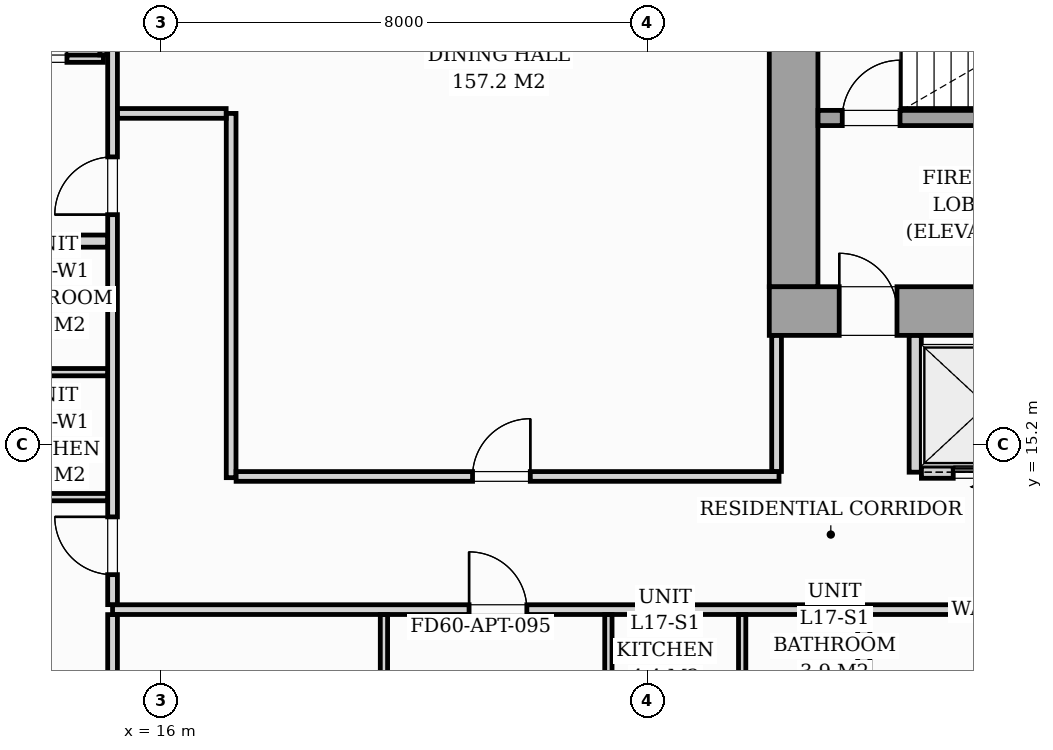
"""IFC4 building model, lengths in metres.
Left out: names, types, materials, properties, quantities, classifications, styles, units other than length and angle.
Written with IfcOpenShell. Run it as: python <this file> out.ifc"""

import sys

from ifc_helpers import new_model, si_unit, direction, frame, frame_2d, origin, origin_2d, place, context, subcontext, project, spatial, rectangle, i_section, extrude, source, transform, mapped, element, fill, save


model = new_model("IFC4")
c1 = context("Model", 3, precision=1e-05, world=origin(), true_north=direction((0.0, 1.0)))
c2 = subcontext(c1, "Body", "Model", "MODEL_VIEW")
j1 = project(units=[si_unit("LENGTHUNIT", "METRE"), si_unit("PLANEANGLEUNIT", "RADIAN")], contexts=[c1])
p1 = place(None, origin())
s1 = spatial("IfcSite", under=j1, at=p1, CompositionType="ELEMENT")
p2 = place(p1, origin())
s2 = spatial("IfcBuilding", under=s1, at=p2, CompositionType="ELEMENT")
p3 = place(p2, frame((0.0, 0.0, 61.4)))
s3 = spatial("IfcBuildingStorey", under=s2, at=p3, CompositionType="ELEMENT", Elevation=61.4)
m1 = source(origin(), c2, "Body", "SweptSolid", [
    extrude(i_section(OverallWidth=0.437, OverallDepth=0.514, WebThickness=0.061, FlangeThickness=0.097, FilletRadius=0.018, at=origin_2d()), origin(), (0.0, 0.0, 1.0), 3.196),
])
p4 = place(p3, frame((26.4, 17.4, 0.002), z_axis=(0.0, 0.0, 1.0), x_axis=(1.0, 0.0, 0.0)))
e1 = element("IfcColumn", 1, at=p4, inside=s3, PredefinedType="PILASTER", context=c2, shape_type="MappedRepresentation", body=[
    mapped(m1, transform((0.0, 0.0, 0.0), scale=1.0)),
])
p5 = place(p3, frame((26.0, 17.4, 0.0), z_axis=(0.0, 0.0, 1.0), x_axis=(1.0, 0.0, 0.0)))
e2 = element("IfcWall", 2, at=p5, inside=s3, PredefinedType="SHEAR", context=c2, shape_type="SweptSolid", body=[
    extrude(rectangle(XDim=20.0, YDim=0.8, at=frame_2d((10.0, 0.0))), origin(), (0.0, 0.0, 1.0), 3.2),
])
p6 = place(p5, frame((1.15, 0.0, 0.0)))
e3 = element("IfcOpeningElement", 3, at=p6, cuts=e2, PredefinedType="OPENING", context=c2, shape_type="SweptSolid", body=[
    extrude(rectangle(XDim=0.95, YDim=2.06, at=frame_2d((0.475, 1.03))), frame((0.0, 0.41, 0.0), z_axis=(0.0, -1.0, 0.0), x_axis=(1.0, 0.0, 0.0)), (0.0, 0.0, 1.0), 0.82),
])
p7 = place(p5, frame((9.58, 0.0, 0.0)))
e4 = element("IfcOpeningElement", 4, at=p7, cuts=e2, PredefinedType="OPENING", context=c2, shape_type="SweptSolid", body=[
    extrude(rectangle(XDim=0.85, YDim=2.0, at=frame_2d((0.425, 1.0))), frame((0.0, 0.41, 0.0), z_axis=(0.0, -1.0, 0.0), x_axis=(1.0, 0.0, 0.0)), (0.0, 0.0, 1.0), 0.82),
])
p8 = place(p5, frame((17.75, 0.0, 0.0)))
e5 = element("IfcOpeningElement", 5, at=p8, cuts=e2, PredefinedType="OPENING", context=c2, shape_type="SweptSolid", body=[
    extrude(rectangle(XDim=0.95, YDim=2.06, at=frame_2d((0.475, 1.03))), frame((0.0, 0.41, 0.0), z_axis=(0.0, -1.0, 0.0), x_axis=(1.0, 0.0, 0.0)), (0.0, 0.0, 1.0), 0.82),
])
p9 = place(p3, frame((26.4, 17.802, 0.0), z_axis=(0.0, 0.0, 1.0), x_axis=(0.0, 1.0, 0.0)))
e6 = element("IfcWall", 6, at=p9, inside=s3, PredefinedType="SHEAR", context=c2, shape_type="SweptSolid", body=[
    extrude(rectangle(XDim=5.796, YDim=0.8, at=frame_2d((2.898, 0.0))), origin(), (0.0, 0.0, 1.0), 3.2),
])
p10 = place(p3, frame((26.802, 20.575, 0.0), z_axis=(0.0, 0.0, 1.0), x_axis=(1.0, 0.0, 0.0)))
e7 = element("IfcWall", 7, at=p10, inside=s3, PredefinedType="SOLIDWALL", context=c2, shape_type="SweptSolid", body=[
    extrude(rectangle(XDim=8.148, YDim=0.25, at=frame_2d((4.074, 0.0))), origin(), (0.0, 0.0, 1.0), 3.2),
])
p11 = place(p10, frame((0.398, 0.0, 0.0)))
e8 = element("IfcOpeningElement", 8, at=p11, cuts=e7, PredefinedType="OPENING", context=c2, shape_type="SweptSolid", body=[
    extrude(rectangle(XDim=0.95, YDim=2.06, at=frame_2d((0.475, 1.03))), frame((0.0, 0.135, 0.0), z_axis=(0.0, -1.0, 0.0), x_axis=(1.0, 0.0, 0.0)), (0.0, 0.0, 1.0), 0.27),
])
p12 = place(p3, frame((28.4, 14.75, 0.0), z_axis=(0.0, 0.0, 1.0), x_axis=(0.0, 1.0, 0.0)))
e9 = element("IfcWall", 9, at=p12, inside=s3, PredefinedType="PARTITIONING", context=c2, shape_type="SweptSolid", body=[
    extrude(rectangle(XDim=2.248, YDim=0.2, at=frame_2d((1.124, 0.0))), origin(), (0.0, 0.0, 1.0), 2.94),
])
p13 = place(p3, frame((28.502, 14.75, 0.0), z_axis=(0.0, 0.0, 1.0), x_axis=(1.0, 0.0, 0.0)))
e10 = element("IfcWall", 10, at=p13, inside=s3, PredefinedType="PARTITIONING", context=c2, shape_type="SweptSolid", body=[
    extrude(rectangle(XDim=2.146, YDim=0.2, at=frame_2d((1.073, 0.0))), origin(), (0.0, 0.0, 1.0), 2.94),
])
p14 = place(p13, frame((0.523, 0.0, 0.0)))
e11 = element("IfcOpeningElement", 11, at=p14, cuts=e10, PredefinedType="OPENING", context=c2, shape_type="SweptSolid", body=[
    extrude(rectangle(XDim=1.05, YDim=2.08, at=frame_2d((0.525, 1.04))), frame((0.0, 0.11, 0.0), z_axis=(0.0, -1.0, 0.0), x_axis=(1.0, 0.0, 0.0)), (0.0, 0.0, 1.0), 0.22),
])
p15 = place(p3, frame((15.2, 12.49, 0.0), z_axis=(0.0, 0.0, 1.0), x_axis=(1.0, 0.0, 0.0)))
e12 = element("IfcWall", 12, at=p15, inside=s3, PredefinedType="PARTITIONING", context=c2, shape_type="SweptSolid", body=[
    extrude(rectangle(XDim=37.1, YDim=0.16, at=frame_2d((18.55, 0.0))), origin(), (0.0, 0.0, 1.0), 2.94),
])
p16 = place(p15, frame((5.863, 0.0, 0.0)))
e13 = element("IfcOpeningElement", 13, at=p16, cuts=e12, PredefinedType="OPENING", context=c2, shape_type="SweptSolid", body=[
    extrude(rectangle(XDim=0.95, YDim=2.06, at=frame_2d((0.475, 1.03))), frame((0.0, 0.09, 0.0), z_axis=(0.0, -1.0, 0.0), x_axis=(1.0, 0.0, 0.0)), (0.0, 0.0, 1.0), 0.18),
])
p17 = place(p15, frame((18.25, 0.0, 0.0)))
e14 = element("IfcOpeningElement", 14, at=p17, cuts=e12, PredefinedType="OPENING", context=c2, shape_type="SweptSolid", body=[
    extrude(rectangle(XDim=0.95, YDim=2.06, at=frame_2d((0.475, 1.03))), frame((0.0, 0.09, 0.0), z_axis=(0.0, -1.0, 0.0), x_axis=(1.0, 0.0, 0.0)), (0.0, 0.0, 1.0), 0.18),
])
p18 = place(p15, frame((30.63, 0.0, 0.0)))
e15 = element("IfcOpeningElement", 15, at=p18, cuts=e12, PredefinedType="OPENING", context=c2, shape_type="SweptSolid", body=[
    extrude(rectangle(XDim=0.95, YDim=2.06, at=frame_2d((0.475, 1.03))), frame((0.0, 0.09, 0.0), z_axis=(0.0, -1.0, 0.0), x_axis=(1.0, 0.0, 0.0)), (0.0, 0.0, 1.0), 0.18),
])
p19 = place(p3, frame((15.2, 2.962, 0.0), z_axis=(0.0, 0.0, 1.0), x_axis=(0.0, 1.0, 0.0)))
e16 = element("IfcWall", 16, at=p19, inside=s3, PredefinedType="PARTITIONING", context=c2, shape_type="SweptSolid", body=[
    extrude(rectangle(XDim=9.446, YDim=0.16, at=frame_2d((4.723, 0.0))), origin(), (0.0, 0.0, 1.0), 2.94),
])
p20 = place(p3, frame((15.2, 12.572, 0.0), z_axis=(0.0, 0.0, 1.0), x_axis=(0.0, 1.0, 0.0)))
e17 = element("IfcWall", 17, at=p20, inside=s3, PredefinedType="PARTITIONING", context=c2, shape_type="SweptSolid", body=[
    extrude(rectangle(XDim=14.866, YDim=0.16, at=frame_2d((7.433, 0.0))), origin(), (0.0, 0.0, 1.0), 2.94),
])
p21 = place(p20, frame((0.493, 0.0, 0.0)))
e18 = element("IfcOpeningElement", 18, at=p21, cuts=e17, PredefinedType="OPENING", context=c2, shape_type="SweptSolid", body=[
    extrude(rectangle(XDim=0.95, YDim=2.06, at=frame_2d((0.475, 1.03))), frame((0.0, 0.09, 0.0), z_axis=(0.0, -1.0, 0.0), x_axis=(1.0, 0.0, 0.0)), (0.0, 0.0, 1.0), 0.18),
])
p22 = place(p20, frame((6.413, 0.0, 0.0)))
e19 = element("IfcOpeningElement", 19, at=p22, cuts=e17, PredefinedType="OPENING", context=c2, shape_type="SweptSolid", body=[
    extrude(rectangle(XDim=0.95, YDim=2.06, at=frame_2d((0.475, 1.03))), frame((0.0, 0.09, 0.0), z_axis=(0.0, -1.0, 0.0), x_axis=(1.0, 0.0, 0.0)), (0.0, 0.0, 1.0), 0.18),
])
for number, where, z_axis, x_axis in (
    (20, (23.354, 10.302, 0.0), (0.0, 0.0, 1.0), (0.0, 1.0, 0.0)),
    (21, (25.554, 10.302, 0.0), (0.0, 0.0, 1.0), (0.0, 1.0, 0.0)),
):
    element("IfcWall", number, at=place(p3, frame(where, z_axis=z_axis, x_axis=x_axis)), inside=s3, PredefinedType="PARTITIONING", context=c2, shape_type="SweptSolid", body=[
        extrude(rectangle(XDim=2.106, YDim=0.12, at=frame_2d((1.053, 0.0))), origin(), (0.0, 0.0, 1.0), 2.94),
    ])
p23 = place(p3, frame((19.663, 2.962, 0.0), z_axis=(0.0, 0.0, 1.0), x_axis=(0.0, 1.0, 0.0)))
e22 = element("IfcWall", 22, at=p23, inside=s3, PredefinedType="PARTITIONING", context=c2, shape_type="SweptSolid", body=[
    extrude(rectangle(XDim=9.446, YDim=0.12, at=frame_2d((4.723, 0.0))), origin(), (0.0, 0.0, 1.0), 2.94),
])
p24 = place(p23, frame((4.288, 0.0, 0.0)))
e23 = element("IfcOpeningElement", 23, at=p24, cuts=e22, PredefinedType="OPENING", context=c2, shape_type="SweptSolid", body=[
    extrude(rectangle(XDim=0.85, YDim=2.05, at=frame_2d((0.425, 1.025))), frame((0.0, 0.07, 0.0), z_axis=(0.0, -1.0, 0.0), x_axis=(1.0, 0.0, 0.0)), (0.0, 0.0, 1.0), 0.14),
])
p25 = place(p3, frame((27.554, 10.302, 0.0), z_axis=(0.0, 0.0, 1.0), x_axis=(0.0, 1.0, 0.0)))
e24 = element("IfcWall", 24, at=p25, inside=s3, PredefinedType="PARTITIONING", context=c2, shape_type="SweptSolid", body=[
    extrude(rectangle(XDim=2.106, YDim=0.2, at=frame_2d((1.053, 0.0))), origin(), (0.0, 0.0, 1.0), 2.94),
])
p26 = place(p3, frame((5.88, 18.55, 0.0), z_axis=(0.0, 0.0, 1.0), x_axis=(1.0, 0.0, 0.0)))
e25 = element("IfcWall", 25, at=p26, inside=s3, PredefinedType="PARTITIONING", context=c2, shape_type="SweptSolid", body=[
    extrude(rectangle(XDim=9.238, YDim=0.2, at=frame_2d((4.619, 0.0))), origin(), (0.0, 0.0, 1.0), 2.94),
])
for number, where, z_axis, x_axis in (
    (26, (12.862, 16.395, 0.0), (0.0, 0.0, 1.0), (1.0, 0.0, 0.0)),
    (27, (12.862, 14.34, 0.0), (0.0, 0.0, 1.0), (1.0, 0.0, 0.0)),
):
    element("IfcWall", number, at=place(p3, frame(where, z_axis=z_axis, x_axis=x_axis)), inside=s3, PredefinedType="PARTITIONING", context=c2, shape_type="SweptSolid", body=[
        extrude(rectangle(XDim=2.256, YDim=0.12, at=frame_2d((1.128, 0.0))), origin(), (0.0, 0.0, 1.0), 2.94),
    ])
p27 = place(p3, frame((10.85, 21.55, 0.0), z_axis=(0.0, 0.0, 1.0), x_axis=(1.0, 0.0, 0.0)))
e28 = element("IfcWall", 28, at=p27, inside=s3, PredefinedType="PARTITIONING", context=c2, shape_type="SweptSolid", body=[
    extrude(rectangle(XDim=4.2, YDim=0.12, at=frame_2d((2.1, 0.0))), origin(), (0.0, 0.0, 1.0), 2.94),
])
p28 = place(p27, frame((0.675, 0.0, 0.0)))
e29 = element("IfcOpeningElement", 29, at=p28, cuts=e28, PredefinedType="OPENING", context=c2, shape_type="SweptSolid", body=[
    extrude(rectangle(XDim=0.85, YDim=2.05, at=frame_2d((0.425, 1.025))), frame((0.0, 0.07, 0.0), z_axis=(0.0, -1.0, 0.0), x_axis=(1.0, 0.0, 0.0)), (0.0, 0.0, 1.0), 0.14),
])
p29 = place(p27, frame((2.8, 0.0, 0.0)))
e30 = element("IfcOpeningElement", 30, at=p29, cuts=e28, PredefinedType="OPENING", context=c2, shape_type="SweptSolid", body=[
    extrude(rectangle(XDim=0.8, YDim=2.02, at=frame_2d((0.4, 1.01))), frame((0.0, 0.07, 0.0), z_axis=(0.0, -1.0, 0.0), x_axis=(1.0, 0.0, 0.0)), (0.0, 0.0, 1.0), 0.14),
])
p30 = place(p3, frame((15.05, 21.612, 0.0), z_axis=(0.0, 0.0, 1.0), x_axis=(0.0, 1.0, 0.0)))
e31 = element("IfcWall", 31, at=p30, inside=s3, PredefinedType="PARTITIONING", context=c2, shape_type="SweptSolid", body=[
    extrude(rectangle(XDim=2.126, YDim=0.12, at=frame_2d((1.063, 0.0))), origin(), (0.0, 0.0, 1.0), 2.94),
])
p31 = place(p3, frame((17.15, 14.66, 0.0), z_axis=(0.0, 0.0, 1.0), x_axis=(0.0, 1.0, 0.0)))
e32 = element("IfcWall", 32, at=p31, inside=s3, PredefinedType="PARTITIONING", context=c2, shape_type="SweptSolid", body=[
    extrude(rectangle(XDim=5.99, YDim=0.16, at=frame_2d((2.995, 0.0))), origin(), (0.0, 0.0, 1.0), 2.94),
])
p32 = place(p3, frame((15.282, 20.65, 0.0), z_axis=(0.0, 0.0, 1.0), x_axis=(1.0, 0.0, 0.0)))
e33 = element("IfcWall", 33, at=p32, inside=s3, PredefinedType="PARTITIONING", context=c2, shape_type="SweptSolid", body=[
    extrude(rectangle(XDim=1.786, YDim=0.16, at=frame_2d((0.893, 0.0))), origin(), (0.0, 0.0, 1.0), 2.94),
])
p33 = place(p3, frame((17.232, 14.68, 0.0), z_axis=(0.0, 0.0, 1.0), x_axis=(1.0, 0.0, 0.0)))
e34 = element("IfcWall", 34, at=p33, inside=s3, PredefinedType="PARTITIONING", context=c2, shape_type="SweptSolid", body=[
    extrude(rectangle(XDim=8.928, YDim=0.16, at=frame_2d((4.464, 0.0))), origin(), (0.0, 0.0, 1.0), 2.94),
])
p34 = place(p33, frame((3.888, 0.0, 0.0)))
e35 = element("IfcOpeningElement", 35, at=p34, cuts=e34, PredefinedType="OPENING", context=c2, shape_type="SweptSolid", body=[
    extrude(rectangle(XDim=0.95, YDim=2.06, at=frame_2d((0.475, 1.03))), frame((0.0, 0.09, 0.0), z_axis=(0.0, -1.0, 0.0), x_axis=(1.0, 0.0, 0.0)), (0.0, 0.0, 1.0), 0.18),
])
p35 = place(p3, frame((26.12, 14.762, 0.0), z_axis=(0.0, 0.0, 1.0), x_axis=(0.0, 1.0, 0.0)))
e36 = element("IfcWall", 36, at=p35, inside=s3, PredefinedType="PARTITIONING", context=c2, shape_type="SweptSolid", body=[
    extrude(rectangle(XDim=2.236, YDim=0.16, at=frame_2d((1.118, 0.0))), origin(), (0.0, 0.0, 1.0), 2.94),
])
m2 = source(origin(), c2, "Body", "SweptSolid", [
    extrude(rectangle(XDim=0.95, YDim=2.06, at=frame_2d((0.475, 1.03))), frame((0.0, 0.025, 0.0), z_axis=(0.0, -1.0, 0.0), x_axis=(1.0, 0.0, 0.0)), (0.0, 0.0, 1.0), 0.05),
])
p36 = place(p6, origin())
e37 = element("IfcDoor", 37, at=p36, inside=s3, OperationType="SINGLE_SWING_LEFT", PredefinedType="DOOR", context=c2, shape_type="MappedRepresentation", body=[
    mapped(m2, transform((0.0, 0.0, 0.0), scale=1.0)),
])
fill(e3, e37)
p37 = place(p11, origin())
e38 = element("IfcDoor", 38, at=p37, inside=s3, OperationType="SINGLE_SWING_RIGHT", PredefinedType="DOOR", context=c2, shape_type="MappedRepresentation", body=[
    mapped(m2, transform((0.0, 0.0, 0.0), scale=1.0)),
])
fill(e8, e38)
m3 = source(origin(), c2, "Body", "SweptSolid", [
    extrude(rectangle(XDim=1.05, YDim=2.08, at=frame_2d((0.525, 1.04))), frame((0.0, 0.025, 0.0), z_axis=(0.0, -1.0, 0.0), x_axis=(1.0, 0.0, 0.0)), (0.0, 0.0, 1.0), 0.05),
])
p38 = place(p14, origin())
e39 = element("IfcDoor", 39, at=p38, inside=s3, OperationType="SLIDING_TO_LEFT", PredefinedType="DOOR", context=c2, shape_type="MappedRepresentation", body=[
    mapped(m3, transform((0.0, 0.0, 0.0), scale=1.0)),
])
fill(e11, e39)
m4 = source(origin(), c2, "Body", "SweptSolid", [
    extrude(rectangle(XDim=0.95, YDim=2.06, at=frame_2d((0.475, 1.03))), frame((0.0, 0.025, 0.0), z_axis=(0.0, -1.0, 0.0), x_axis=(1.0, 0.0, 0.0)), (0.0, 0.0, 1.0), 0.05),
])
p39 = place(p16, origin())
e40 = element("IfcDoor", 40, at=p39, inside=s3, OperationType="SINGLE_SWING_LEFT", PredefinedType="DOOR", context=c2, shape_type="MappedRepresentation", body=[
    mapped(m4, transform((0.0, 0.0, 0.0), scale=1.0)),
])
fill(e13, e40)
p40 = place(p21, origin())
e41 = element("IfcDoor", 41, at=p40, inside=s3, OperationType="SINGLE_SWING_RIGHT", PredefinedType="DOOR", context=c2, shape_type="MappedRepresentation", body=[
    mapped(m4, transform((0.0, 0.0, 0.0), scale=1.0)),
])
fill(e18, e41)
p41 = place(p22, origin())
e42 = element("IfcDoor", 42, at=p41, inside=s3, OperationType="SINGLE_SWING_LEFT", PredefinedType="DOOR", context=c2, shape_type="MappedRepresentation", body=[
    mapped(m4, transform((0.0, 0.0, 0.0), scale=1.0)),
])
fill(e19, e42)
m5 = source(origin(), c2, "Body", "SweptSolid", [
    extrude(rectangle(XDim=0.8, YDim=2.02, at=frame_2d((0.4, 1.01))), frame((0.0, 0.025, 0.0), z_axis=(0.0, -1.0, 0.0), x_axis=(1.0, 0.0, 0.0)), (0.0, 0.0, 1.0), 0.05),
])
p42 = place(p29, origin())
e43 = element("IfcDoor", 43, at=p42, inside=s3, OperationType="SINGLE_SWING_RIGHT", PredefinedType="DOOR", context=c2, shape_type="MappedRepresentation", body=[
    mapped(m5, transform((0.0, 0.0, 0.0), scale=1.0)),
])
fill(e30, e43)
p43 = place(p34, origin())
e44 = element("IfcDoor", 44, at=p43, inside=s3, OperationType="SINGLE_SWING_RIGHT", PredefinedType="DOOR", context=c2, shape_type="MappedRepresentation", body=[
    mapped(m4, transform((0.0, 0.0, 0.0), scale=1.0)),
])
fill(e35, e44)
save(model, sys.argv[1])
